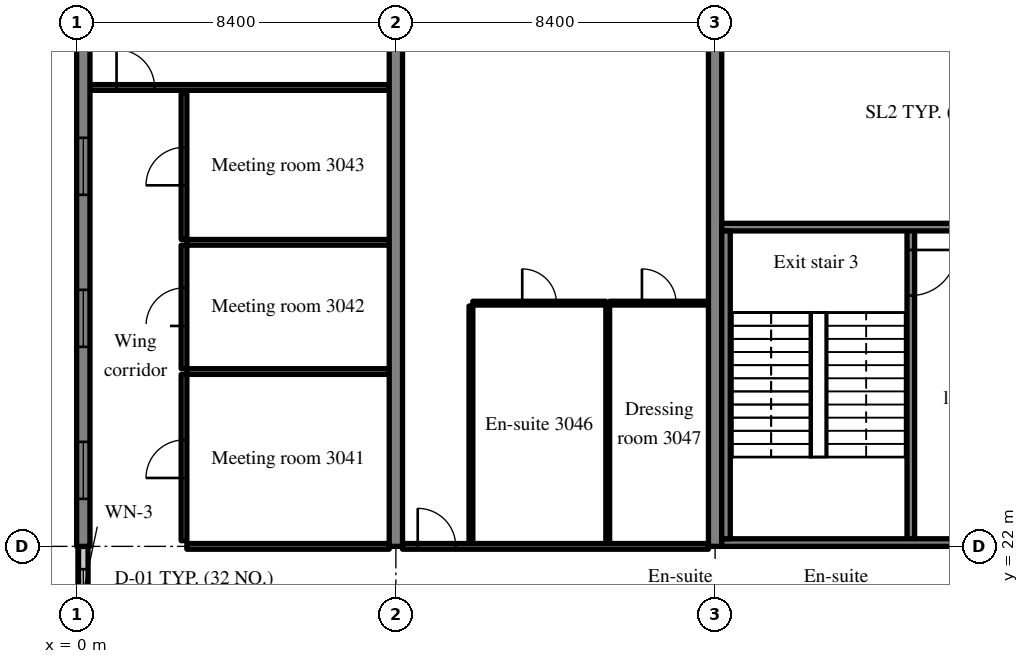
"""IFC4 building model, lengths in metres.
Left out: names, types, materials, properties, quantities, classifications, styles, units other than length and angle.
Written with IfcOpenShell. Run it as: python <this file> out.ifc"""

import sys

from ifc_helpers import new_model, si_unit, direction, frame, frame_2d, origin, place, context, subcontext, project, spatial, rectangle, extrude, source, transform, mapped, element, fill, save


model = new_model("IFC4")
c1 = context("Model", 3, precision=1e-05, world=origin(), true_north=direction((0.0, 1.0)))
c2 = subcontext(c1, "Body", "Model", "MODEL_VIEW")
j1 = project(units=[si_unit("LENGTHUNIT", "METRE"), si_unit("PLANEANGLEUNIT", "RADIAN")], contexts=[c1])
p1 = place(None, origin())
s1 = spatial("IfcSite", under=j1, at=p1, CompositionType="ELEMENT")
p2 = place(p1, origin())
s2 = spatial("IfcBuilding", under=s1, at=p2, CompositionType="ELEMENT")
p3 = place(p2, frame((0.0, 0.0, 125.6)))
s3 = spatial("IfcBuildingStorey", under=s2, at=p3, CompositionType="ELEMENT", Elevation=125.6)
m1 = source(origin(), c2, "Body", "SweptSolid", [
    extrude(rectangle(XDim=16.0, YDim=0.35, at=frame_2d((8.0, 0.0))), origin(), (0.0, 0.0, 1.0), 3.52),
])
p4 = place(p3, frame((0.175, 22.0, 0.0), z_axis=(0.0, 0.0, 1.0), x_axis=(0.0, 1.0, 0.0)))
e1 = element("IfcWall", 1, at=p4, inside=s3, PredefinedType="SHEAR", context=c2, shape_type="MappedRepresentation", body=[
    mapped(m1, transform((0.0, 0.0, 0.0), scale=1.0)),
])
m2 = source(origin(), c2, "Body", "SweptSolid", [
    extrude(rectangle(XDim=1.5, YDim=1.5, at=frame_2d((0.75, 0.75))), frame((0.0, 0.185, 0.0), z_axis=(0.0, -1.0, 0.0), x_axis=(1.0, 0.0, 0.0)), (0.0, 0.0, 1.0), 0.37),
])
p5 = place(p4, frame((1.25, 0.0, 0.9)))
e2 = element("IfcOpeningElement", 2, at=p5, cuts=e1, PredefinedType="OPENING", context=c2, shape_type="MappedRepresentation", body=[
    mapped(m2, transform((0.0, 0.0, 0.0), scale=1.0)),
])
p6 = place(p4, frame((5.25, 0.0, 0.9)))
e3 = element("IfcOpeningElement", 3, at=p6, cuts=e1, PredefinedType="OPENING", context=c2, shape_type="MappedRepresentation", body=[
    mapped(m2, transform((0.0, 0.0, 0.0), scale=1.0)),
])
p7 = place(p4, frame((9.25, 0.0, 0.9)))
e4 = element("IfcOpeningElement", 4, at=p7, cuts=e1, PredefinedType="OPENING", context=c2, shape_type="MappedRepresentation", body=[
    mapped(m2, transform((0.0, 0.0, 0.0), scale=1.0)),
])
p8 = place(p4, frame((13.25, 0.0, 0.9)))
e5 = element("IfcOpeningElement", 5, at=p8, cuts=e1, PredefinedType="OPENING", context=c2, shape_type="MappedRepresentation", body=[
    mapped(m2, transform((0.0, 0.0, 0.0), scale=1.0)),
])
m3 = source(origin(), c2, "Body", "SweptSolid", [
    extrude(rectangle(XDim=20.0, YDim=0.35, at=frame_2d((10.0, 0.0))), origin(), (0.0, 0.0, 1.0), 3.52),
])
for number, where, z_axis, x_axis in (
    (6, (8.4, 22.0, 0.0), (0.0, 0.0, 1.0), (0.0, 1.0, 0.0)),
    (7, (16.8, 22.0, 0.0), (0.0, 0.0, 1.0), (0.0, 1.0, 0.0)),
):
    element("IfcWall", number, at=place(p3, frame(where, z_axis=z_axis, x_axis=x_axis)), inside=s3, PredefinedType="SHEAR", context=c2, shape_type="MappedRepresentation", body=[
        mapped(m3, transform((0.0, 0.0, 0.0), scale=1.0)),
    ])
m4 = source(origin(), c2, "Body", "SweptSolid", [
    extrude(rectangle(XDim=2.4, YDim=0.25, at=frame_2d((1.2, 0.0))), origin(), (0.0, 0.0, 1.0), 2.62),
])
p9 = place(p3, frame((0.175, 19.6, 0.0), z_axis=(0.0, 0.0, 1.0), x_axis=(0.0, 1.0, 0.0)))
e8 = element("IfcWall", 8, at=p9, inside=s3, PredefinedType="SOLIDWALL", context=c2, shape_type="MappedRepresentation", body=[
    mapped(m4, transform((0.0, 0.0, 0.0), scale=1.0)),
])
m5 = source(origin(), c2, "Body", "SweptSolid", [
    extrude(rectangle(XDim=1.2, YDim=1.5, at=frame_2d((0.6, 0.75))), frame((0.0, 0.135, 0.0), z_axis=(0.0, -1.0, 0.0), x_axis=(1.0, 0.0, 0.0)), (0.0, 0.0, 1.0), 0.27),
])
p10 = place(p9, frame((0.6, 0.0, 0.9)))
e9 = element("IfcOpeningElement", 9, at=p10, cuts=e8, PredefinedType="OPENING", context=c2, shape_type="MappedRepresentation", body=[
    mapped(m5, transform((0.0, 0.0, 0.0), scale=1.0)),
])
m6 = source(origin(), c2, "Body", "SweptSolid", [
    extrude(rectangle(XDim=8.3, YDim=0.2, at=frame_2d((4.15, 0.0))), origin(), (0.0, 0.0, 1.0), 3.52),
])
p11 = place(p3, frame((21.95, 22.1, 0.0), z_axis=(0.0, 0.0, 1.0), x_axis=(0.0, 1.0, 0.0)))
e10 = element("IfcWall", 10, at=p11, inside=s3, PredefinedType="SOLIDWALL", context=c2, shape_type="MappedRepresentation", body=[
    mapped(m6, transform((0.0, 0.0, 0.0), scale=1.0)),
])
m7 = source(origin(), c2, "Body", "SweptSolid", [
    extrude(rectangle(XDim=1.2, YDim=2.1, at=frame_2d((0.6, 1.05))), frame((0.0, 0.11, 0.0), z_axis=(0.0, -1.0, 0.0), x_axis=(1.0, 0.0, 0.0)), (0.0, 0.0, 1.0), 0.22),
])
p12 = place(p11, frame((6.5, 0.0, 0.0)))
e11 = element("IfcOpeningElement", 11, at=p12, cuts=e10, PredefinedType="OPENING", context=c2, shape_type="MappedRepresentation", body=[
    mapped(m7, transform((0.0, 0.0, 0.0), scale=1.0)),
])
m8 = source(origin(), c2, "Body", "SweptSolid", [
    extrude(rectangle(XDim=8.225, YDim=0.2, at=frame_2d((4.112, 0.0))), origin(), (0.0, 0.0, 1.0), 3.52),
])
p13 = place(p3, frame((16.975, 22.1, 0.0), z_axis=(0.0, 0.0, 1.0), x_axis=(1.0, 0.0, 0.0)))
e12 = element("IfcWall", 12, at=p13, inside=s3, PredefinedType="SOLIDWALL", context=c2, shape_type="MappedRepresentation", body=[
    mapped(m8, transform((0.0, 0.0, 0.0), scale=1.0)),
])
p14 = place(p13, frame((6.025, 0.0, 0.0)))
e13 = element("IfcOpeningElement", 13, at=p14, cuts=e12, PredefinedType="OPENING", context=c2, shape_type="MappedRepresentation", body=[
    mapped(m7, transform((0.0, 0.0, 0.0), scale=1.0)),
])
p15 = place(p3, frame((16.975, 30.4, 0.0), z_axis=(0.0, 0.0, 1.0), x_axis=(1.0, 0.0, 0.0)))
e14 = element("IfcWall", 14, at=p15, inside=s3, PredefinedType="SOLIDWALL", context=c2, shape_type="MappedRepresentation", body=[
    mapped(m8, transform((0.0, 0.0, 0.0), scale=1.0)),
])
m9 = source(origin(), c2, "Body", "SweptSolid", [
    extrude(rectangle(XDim=1.0, YDim=2.1, at=frame_2d((0.5, 1.05))), frame((0.0, 0.11, 0.0), z_axis=(0.0, -1.0, 0.0), x_axis=(1.0, 0.0, 0.0)), (0.0, 0.0, 1.0), 0.22),
])
p16 = place(p15, frame((6.125, 0.0, 0.0)))
e15 = element("IfcOpeningElement", 15, at=p16, cuts=e14, PredefinedType="OPENING", context=c2, shape_type="MappedRepresentation", body=[
    mapped(m9, transform((0.0, 0.0, 0.0), scale=1.0)),
])
m10 = source(origin(), c2, "Body", "SweptSolid", [
    extrude(rectangle(XDim=8.1, YDim=0.225, at=frame_2d((4.05, 0.0))), origin(), (0.0, 0.0, 1.0), 3.52),
])
p17 = place(p3, frame((17.087, 22.2, 0.0), z_axis=(0.0, 0.0, 1.0), x_axis=(0.0, 1.0, 0.0)))
e16 = element("IfcWall", 16, at=p17, inside=s3, PredefinedType="SOLIDWALL", context=c2, shape_type="MappedRepresentation", body=[
    mapped(m10, transform((0.0, 0.0, 0.0), scale=1.0)),
])
m11 = source(origin(), c2, "Body", "SweptSolid", [
    extrude(rectangle(XDim=5.325, YDim=0.15, at=frame_2d((2.663, 0.0))), origin(), (0.0, 0.0, 1.0), 2.82),
])
p18 = place(p3, frame((2.9, 22.0, 0.0), z_axis=(0.0, 0.0, 1.0), x_axis=(1.0, 0.0, 0.0)))
e17 = element("IfcWall", 17, at=p18, inside=s3, PredefinedType="PARTITIONING", context=c2, shape_type="MappedRepresentation", body=[
    mapped(m11, transform((0.0, 0.0, 0.0), scale=1.0)),
])
m12 = source(origin(), c2, "Body", "SweptSolid", [
    extrude(rectangle(XDim=4.375, YDim=0.15, at=frame_2d((2.188, 0.0))), origin(), (0.0, 0.0, 1.0), 3.52),
])
p19 = place(p3, frame((2.825, 22.15, 0.0), z_axis=(0.0, 0.0, 1.0), x_axis=(0.0, 1.0, 0.0)))
e18 = element("IfcWall", 18, at=p19, inside=s3, PredefinedType="PARTITIONING", context=c2, shape_type="MappedRepresentation", body=[
    mapped(m12, transform((0.0, 0.0, 0.0), scale=1.0)),
])
m13 = source(origin(), c2, "Body", "SweptSolid", [
    extrude(rectangle(XDim=1.0, YDim=2.1, at=frame_2d((0.5, 1.05))), frame((0.0, 0.085, 0.0), z_axis=(0.0, -1.0, 0.0), x_axis=(1.0, 0.0, 0.0)), (0.0, 0.0, 1.0), 0.17),
])
p20 = place(p19, frame((1.65, 0.0, 0.0)))
e19 = element("IfcOpeningElement", 19, at=p20, cuts=e18, PredefinedType="OPENING", context=c2, shape_type="MappedRepresentation", body=[
    mapped(m13, transform((0.0, 0.0, 0.0), scale=1.0)),
])
m14 = source(origin(), c2, "Body", "SweptSolid", [
    extrude(rectangle(XDim=5.325, YDim=0.15, at=frame_2d((2.663, 0.0))), origin(), (0.0, 0.0, 1.0), 3.52),
])
p21 = place(p3, frame((2.9, 26.6, 0.0), z_axis=(0.0, 0.0, 1.0), x_axis=(1.0, 0.0, 0.0)))
e20 = element("IfcWall", 20, at=p21, inside=s3, PredefinedType="PARTITIONING", context=c2, shape_type="MappedRepresentation", body=[
    mapped(m14, transform((0.0, 0.0, 0.0), scale=1.0)),
])
m15 = source(origin(), c2, "Body", "SweptSolid", [
    extrude(rectangle(XDim=3.25, YDim=0.15, at=frame_2d((1.625, 0.0))), origin(), (0.0, 0.0, 1.0), 3.52),
])
p22 = place(p3, frame((2.825, 26.675, 0.0), z_axis=(0.0, 0.0, 1.0), x_axis=(0.0, 1.0, 0.0)))
e21 = element("IfcWall", 21, at=p22, inside=s3, PredefinedType="PARTITIONING", context=c2, shape_type="MappedRepresentation", body=[
    mapped(m15, transform((0.0, 0.0, 0.0), scale=1.0)),
])
p23 = place(p22, frame((1.125, 0.0, 0.0)))
e22 = element("IfcOpeningElement", 22, at=p23, cuts=e21, PredefinedType="OPENING", context=c2, shape_type="MappedRepresentation", body=[
    mapped(m13, transform((0.0, 0.0, 0.0), scale=1.0)),
])
p24 = place(p3, frame((2.9, 30.0, 0.0), z_axis=(0.0, 0.0, 1.0), x_axis=(1.0, 0.0, 0.0)))
e23 = element("IfcWall", 23, at=p24, inside=s3, PredefinedType="PARTITIONING", context=c2, shape_type="MappedRepresentation", body=[
    mapped(m14, transform((0.0, 0.0, 0.0), scale=1.0)),
])
m16 = source(origin(), c2, "Body", "SweptSolid", [
    extrude(rectangle(XDim=3.85, YDim=0.15, at=frame_2d((1.925, 0.0))), origin(), (0.0, 0.0, 1.0), 3.52),
])
p25 = place(p3, frame((2.825, 30.075, 0.0), z_axis=(0.0, 0.0, 1.0), x_axis=(0.0, 1.0, 0.0)))
e24 = element("IfcWall", 24, at=p25, inside=s3, PredefinedType="PARTITIONING", context=c2, shape_type="MappedRepresentation", body=[
    mapped(m16, transform((0.0, 0.0, 0.0), scale=1.0)),
])
p26 = place(p25, frame((1.425, 0.0, 0.0)))
e25 = element("IfcOpeningElement", 25, at=p26, cuts=e24, PredefinedType="OPENING", context=c2, shape_type="MappedRepresentation", body=[
    mapped(m13, transform((0.0, 0.0, 0.0), scale=1.0)),
])
m17 = source(origin(), c2, "Body", "SweptSolid", [
    extrude(rectangle(XDim=7.875, YDim=0.15, at=frame_2d((3.938, 0.0))), origin(), (0.0, 0.0, 1.0), 3.52),
])
p27 = place(p3, frame((0.35, 34.075, 0.0), z_axis=(0.0, 0.0, 1.0), x_axis=(1.0, 0.0, 0.0)))
e26 = element("IfcWall", 26, at=p27, inside=s3, PredefinedType="PARTITIONING", context=c2, shape_type="MappedRepresentation", body=[
    mapped(m17, transform((0.0, 0.0, 0.0), scale=1.0)),
])
p28 = place(p27, frame((0.7, 0.0, 0.0)))
e27 = element("IfcOpeningElement", 27, at=p28, cuts=e26, PredefinedType="OPENING", context=c2, shape_type="MappedRepresentation", body=[
    mapped(m13, transform((0.0, 0.0, 0.0), scale=1.0)),
])
m18 = source(origin(), c2, "Body", "SweptSolid", [
    extrude(rectangle(XDim=6.25, YDim=0.1, at=frame_2d((3.125, 0.0))), origin(), (0.0, 0.0, 1.0), 3.52),
])
for number, where, z_axis, x_axis in (
    (28, (10.375, 22.075, 0.0), (0.0, 0.0, 1.0), (0.0, 1.0, 0.0)),
    (29, (13.975, 22.075, 0.0), (0.0, 0.0, 1.0), (0.0, 1.0, 0.0)),
):
    element("IfcWall", number, at=place(p3, frame(where, z_axis=z_axis, x_axis=x_axis)), inside=s3, PredefinedType="PARTITIONING", context=c2, shape_type="MappedRepresentation", body=[
        mapped(m18, transform((0.0, 0.0, 0.0), scale=1.0)),
    ])
m19 = source(origin(), c2, "Body", "SweptSolid", [
    extrude(rectangle(XDim=3.5, YDim=0.1, at=frame_2d((1.75, 0.0))), origin(), (0.0, 0.0, 1.0), 3.52),
])
p29 = place(p3, frame((10.425, 28.4, 0.0), z_axis=(0.0, 0.0, 1.0), x_axis=(1.0, 0.0, 0.0)))
e30 = element("IfcWall", 30, at=p29, inside=s3, PredefinedType="PARTITIONING", context=c2, shape_type="MappedRepresentation", body=[
    mapped(m19, transform((0.0, 0.0, 0.0), scale=1.0)),
])
m20 = source(origin(), c2, "Body", "SweptSolid", [
    extrude(rectangle(XDim=0.9, YDim=2.1, at=frame_2d((0.45, 1.05))), frame((0.0, 0.06, 0.0), z_axis=(0.0, -1.0, 0.0), x_axis=(1.0, 0.0, 0.0)), (0.0, 0.0, 1.0), 0.12),
])
p30 = place(p29, frame((1.3, 0.0, 0.0)))
e31 = element("IfcOpeningElement", 31, at=p30, cuts=e30, PredefinedType="OPENING", context=c2, shape_type="MappedRepresentation", body=[
    mapped(m20, transform((0.0, 0.0, 0.0), scale=1.0)),
])
m21 = source(origin(), c2, "Body", "SweptSolid", [
    extrude(rectangle(XDim=2.6, YDim=0.1, at=frame_2d((1.3, 0.0))), origin(), (0.0, 0.0, 1.0), 3.52),
])
p31 = place(p3, frame((14.025, 28.4, 0.0), z_axis=(0.0, 0.0, 1.0), x_axis=(1.0, 0.0, 0.0)))
e32 = element("IfcWall", 32, at=p31, inside=s3, PredefinedType="PARTITIONING", context=c2, shape_type="MappedRepresentation", body=[
    mapped(m21, transform((0.0, 0.0, 0.0), scale=1.0)),
])
p32 = place(p31, frame((0.85, 0.0, 0.0)))
e33 = element("IfcOpeningElement", 33, at=p32, cuts=e32, PredefinedType="OPENING", context=c2, shape_type="MappedRepresentation", body=[
    mapped(m20, transform((0.0, 0.0, 0.0), scale=1.0)),
])
m22 = source(origin(), c2, "Body", "SweptSolid", [
    extrude(rectangle(XDim=8.05, YDim=0.15, at=frame_2d((4.025, 0.0))), origin(), (0.0, 0.0, 1.0), 2.82),
])
p33 = place(p3, frame((8.575, 22.0, 0.0), z_axis=(0.0, 0.0, 1.0), x_axis=(1.0, 0.0, 0.0)))
e34 = element("IfcWall", 34, at=p33, inside=s3, PredefinedType="PARTITIONING", context=c2, shape_type="MappedRepresentation", body=[
    mapped(m22, transform((0.0, 0.0, 0.0), scale=1.0)),
])
p34 = place(p33, frame((0.4, 0.0, 0.0)))
e35 = element("IfcOpeningElement", 35, at=p34, cuts=e34, PredefinedType="OPENING", context=c2, shape_type="MappedRepresentation", body=[
    mapped(m13, transform((0.0, 0.0, 0.0), scale=1.0)),
])
m23 = source(origin(), c2, "Body", "SweptSolid", [
    extrude(rectangle(XDim=1.5, YDim=1.5, at=frame_2d((0.75, 0.75))), frame((0.0, 0.03, 0.0), z_axis=(0.0, -1.0, 0.0), x_axis=(1.0, 0.0, 0.0)), (0.0, 0.0, 1.0), 0.06),
])
p35 = place(p5, origin())
e36 = element("IfcWindow", 36, at=p35, inside=s3, PartitioningType="SINGLE_PANEL", PredefinedType="WINDOW", context=c2, shape_type="MappedRepresentation", body=[
    mapped(m23, transform((0.0, 0.0, 0.0), scale=1.0)),
])
fill(e2, e36)
p36 = place(p6, origin())
e37 = element("IfcWindow", 37, at=p36, inside=s3, PartitioningType="SINGLE_PANEL", PredefinedType="WINDOW", context=c2, shape_type="MappedRepresentation", body=[
    mapped(m23, transform((0.0, 0.0, 0.0), scale=1.0)),
])
fill(e3, e37)
p37 = place(p7, origin())
e38 = element("IfcWindow", 38, at=p37, inside=s3, PartitioningType="SINGLE_PANEL", PredefinedType="WINDOW", context=c2, shape_type="MappedRepresentation", body=[
    mapped(m23, transform((0.0, 0.0, 0.0), scale=1.0)),
])
fill(e4, e38)
m24 = source(origin(), c2, "Body", "SweptSolid", [
    extrude(rectangle(XDim=1.2, YDim=1.5, at=frame_2d((0.6, 0.75))), frame((0.0, 0.03, 0.0), z_axis=(0.0, -1.0, 0.0), x_axis=(1.0, 0.0, 0.0)), (0.0, 0.0, 1.0), 0.06),
])
p38 = place(p10, origin())
e39 = element("IfcWindow", 39, at=p38, inside=s3, PartitioningType="SINGLE_PANEL", PredefinedType="WINDOW", context=c2, shape_type="MappedRepresentation", body=[
    mapped(m24, transform((0.0, 0.0, 0.0), scale=1.0)),
])
fill(e9, e39)
m25 = source(origin(), c2, "Body", "SweptSolid", [
    extrude(rectangle(XDim=1.2, YDim=2.1, at=frame_2d((0.6, 1.05))), frame((0.0, 0.025, 0.0), z_axis=(0.0, -1.0, 0.0), x_axis=(1.0, 0.0, 0.0)), (0.0, 0.0, 1.0), 0.05),
])
p39 = place(p12, origin())
e40 = element("IfcDoor", 40, at=p39, inside=s3, OperationType="SINGLE_SWING_RIGHT", PredefinedType="DOOR", context=c2, shape_type="MappedRepresentation", body=[
    mapped(m25, transform((0.0, 0.0, 0.0), scale=1.0)),
])
fill(e11, e40)
m26 = source(origin(), c2, "Body", "SweptSolid", [
    extrude(rectangle(XDim=1.0, YDim=2.1, at=frame_2d((0.5, 1.05))), frame((0.0, 0.025, 0.0), z_axis=(0.0, -1.0, 0.0), x_axis=(1.0, 0.0, 0.0)), (0.0, 0.0, 1.0), 0.05),
])
p40 = place(p20, origin())
e41 = element("IfcDoor", 41, at=p40, inside=s3, OperationType="SINGLE_SWING_LEFT", PredefinedType="DOOR", context=c2, shape_type="MappedRepresentation", body=[
    mapped(m26, transform((0.0, 0.0, 0.0), scale=1.0)),
])
fill(e19, e41)
p41 = place(p23, origin())
e42 = element("IfcDoor", 42, at=p41, inside=s3, OperationType="SINGLE_SWING_LEFT", PredefinedType="DOOR", context=c2, shape_type="MappedRepresentation", body=[
    mapped(m26, transform((0.0, 0.0, 0.0), scale=1.0)),
])
fill(e22, e42)
p42 = place(p26, origin())
e43 = element("IfcDoor", 43, at=p42, inside=s3, OperationType="SINGLE_SWING_LEFT", PredefinedType="DOOR", context=c2, shape_type="MappedRepresentation", body=[
    mapped(m26, transform((0.0, 0.0, 0.0), scale=1.0)),
])
fill(e25, e43)
p43 = place(p28, origin())
e44 = element("IfcDoor", 44, at=p43, inside=s3, OperationType="SINGLE_SWING_LEFT", PredefinedType="DOOR", context=c2, shape_type="MappedRepresentation", body=[
    mapped(m26, transform((0.0, 0.0, 0.0), scale=1.0)),
])
fill(e27, e44)
m27 = source(origin(), c2, "Body", "SweptSolid", [
    extrude(rectangle(XDim=0.9, YDim=2.1, at=frame_2d((0.45, 1.05))), frame((0.0, 0.025, 0.0), z_axis=(0.0, -1.0, 0.0), x_axis=(1.0, 0.0, 0.0)), (0.0, 0.0, 1.0), 0.05),
])
p44 = place(p30, origin())
e45 = element("IfcDoor", 45, at=p44, inside=s3, OperationType="SINGLE_SWING_LEFT", PredefinedType="DOOR", context=c2, shape_type="MappedRepresentation", body=[
    mapped(m27, transform((0.0, 0.0, 0.0), scale=1.0)),
])
fill(e31, e45)
p45 = place(p32, origin())
e46 = element("IfcDoor", 46, at=p45, inside=s3, OperationType="SINGLE_SWING_LEFT", PredefinedType="DOOR", context=c2, shape_type="MappedRepresentation", body=[
    mapped(m27, transform((0.0, 0.0, 0.0), scale=1.0)),
])
fill(e33, e46)
p46 = place(p34, origin())
e47 = element("IfcDoor", 47, at=p46, inside=s3, OperationType="SINGLE_SWING_LEFT", PredefinedType="DOOR", context=c2, shape_type="MappedRepresentation", body=[
    mapped(m26, transform((0.0, 0.0, 0.0), scale=1.0)),
])
fill(e35, e47)
save(model, sys.argv[1])
